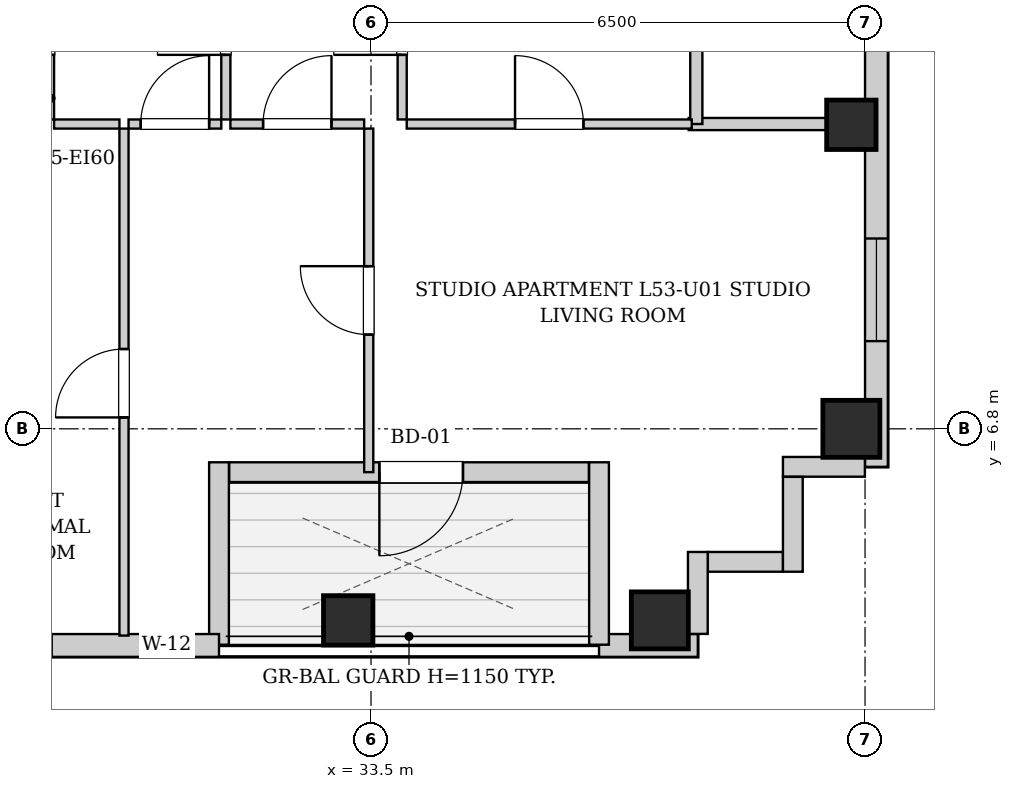
"""IFC4 building model, lengths in metres.
Left out: names, types, materials, properties, quantities, classifications, styles, units other than length and angle.
Written with IfcOpenShell. Run it as: python <this file> out.ifc"""

import sys

from ifc_helpers import new_model, si_unit, direction, frame, frame_2d, origin, origin_2d, place, context, subcontext, project, spatial, rectangle, extrude, element, fill, save


model = new_model("IFC4")
c1 = context("Model", 3, precision=1e-05, world=origin(), true_north=direction((0.0, 1.0)))
c2 = subcontext(c1, "Body", "Model", "MODEL_VIEW")
j1 = project(units=[si_unit("LENGTHUNIT", "METRE"), si_unit("PLANEANGLEUNIT", "RADIAN")], contexts=[c1])
p1 = place(None, origin())
s1 = spatial("IfcSite", under=j1, at=p1, CompositionType="ELEMENT")
p2 = place(p1, origin())
s2 = spatial("IfcBuilding", under=s1, at=p2, CompositionType="ELEMENT")
p3 = place(p2, frame((0.0, 0.0, 184.3)))
s3 = spatial("IfcBuildingStorey", under=s2, at=p3, CompositionType="ELEMENT", Elevation=184.3)
p4 = place(p3, frame((33.2, 4.28, 0.0), z_axis=(0.0, 0.0, 1.0), x_axis=(1.0, 0.0, 0.0)))
e1 = element("IfcColumn", 1, at=p4, inside=s3, PredefinedType="COLUMN", context=c2, shape_type="SweptSolid", body=[
    extrude(rectangle(XDim=0.65, YDim=0.65, at=origin_2d()), origin(), (0.0, 0.0, 1.0), 3.3),
])
for number, where, z_axis, x_axis in (
    (2, (37.3, 4.28, 0.0), (0.0, 0.0, 1.0), (1.0, 0.0, 0.0)),
    (3, (39.82, 6.8, 0.0), (0.0, 0.0, 1.0), (1.0, 0.0, 0.0)),
):
    element("IfcColumn", number, at=place(p3, frame(where, z_axis=z_axis, x_axis=x_axis)), inside=s3, PredefinedType="COLUMN", context=c2, shape_type="SweptSolid", body=[
        extrude(rectangle(XDim=0.75, YDim=0.75, at=origin_2d()), origin(), (0.0, 0.0, 1.0), 3.3),
    ])
p5 = place(p3, frame((39.82, 10.8, 0.0), z_axis=(0.0, 0.0, 1.0), x_axis=(1.0, 0.0, 0.0)))
e4 = element("IfcColumn", 4, at=p5, inside=s3, PredefinedType="COLUMN", context=c2, shape_type="SweptSolid", body=[
    extrude(rectangle(XDim=0.65, YDim=0.65, at=origin_2d()), origin(), (0.0, 0.0, 1.0), 3.3),
])
p6 = place(p3, frame((40.15, 37.7, 0.0), z_axis=(0.0, 0.0, 1.0), x_axis=(0.0, -1.0, 0.0)))
e5 = element("IfcWall", 5, at=p6, inside=s3, PredefinedType="SOLIDWALL", context=c2, shape_type="SweptSolid", body=[
    extrude(rectangle(XDim=31.4, YDim=0.3, at=frame_2d((15.7, 0.0))), origin(), (0.0, 0.0, 1.0), 3.04),
])
p7 = place(p6, frame((28.396, 0.0, 0.55)))
e6 = element("IfcOpeningElement", 6, at=p7, cuts=e5, PredefinedType="OPENING", context=c2, shape_type="SweptSolid", body=[
    extrude(rectangle(XDim=1.35, YDim=1.2, at=frame_2d((0.675, 0.6))), frame((0.0, 0.16, 0.0), z_axis=(0.0, -1.0, 0.0), x_axis=(1.0, 0.0, 0.0)), (0.0, 0.0, 1.0), 0.32),
])
p8 = place(p6, frame((1.653, 0.0, 0.55)))
e7 = element("IfcOpeningElement", 7, at=p8, cuts=e5, PredefinedType="OPENING", context=c2, shape_type="SweptSolid", body=[
    extrude(rectangle(XDim=1.35, YDim=1.2, at=frame_2d((0.675, 0.6))), frame((0.0, 0.16, 0.0), z_axis=(0.0, -1.0, 0.0), x_axis=(1.0, 0.0, 0.0)), (0.0, 0.0, 1.0), 0.32),
])
p9 = place(p6, frame((19.683, 0.0, 0.55)))
e8 = element("IfcOpeningElement", 8, at=p9, cuts=e5, PredefinedType="OPENING", context=c2, shape_type="SweptSolid", body=[
    extrude(rectangle(XDim=1.35, YDim=1.2, at=frame_2d((0.675, 0.6))), frame((0.0, 0.16, 0.0), z_axis=(0.0, -1.0, 0.0), x_axis=(1.0, 0.0, 0.0)), (0.0, 0.0, 1.0), 0.32),
])
p10 = place(p6, frame((10.367, 0.0, 0.55)))
e9 = element("IfcOpeningElement", 9, at=p10, cuts=e5, PredefinedType="OPENING", context=c2, shape_type="SweptSolid", body=[
    extrude(rectangle(XDim=1.35, YDim=1.2, at=frame_2d((0.675, 0.6))), frame((0.0, 0.16, 0.0), z_axis=(0.0, -1.0, 0.0), x_axis=(1.0, 0.0, 0.0)), (0.0, 0.0, 1.0), 0.32),
])
p11 = place(p3, frame((37.8, 3.95, 0.0), z_axis=(0.0, 0.0, 1.0), x_axis=(-1.0, 0.0, 0.0)))
e10 = element("IfcWall", 10, at=p11, inside=s3, PredefinedType="SOLIDWALL", context=c2, shape_type="SweptSolid", body=[
    extrude(rectangle(XDim=1.3, YDim=0.3, at=frame_2d((0.65, 0.0))), origin(), (0.0, 0.0, 1.0), 3.04),
])
p12 = place(p3, frame((36.5, 3.96, 0.0), z_axis=(0.0, 0.0, 1.0), x_axis=(0.0, 1.0, 0.0)))
e11 = element("IfcWall", 11, at=p12, inside=s3, PredefinedType="SOLIDWALL", context=c2, shape_type="SweptSolid", body=[
    extrude(rectangle(XDim=2.4, YDim=0.26, at=frame_2d((1.2, 0.0))), origin(), (0.0, 0.0, 1.0), 3.04),
])
p13 = place(p3, frame((36.366, 6.23, 0.0), z_axis=(0.0, 0.0, 1.0), x_axis=(-1.0, 0.0, 0.0)))
e12 = element("IfcWall", 12, at=p13, inside=s3, PredefinedType="SOLIDWALL", context=c2, shape_type="SweptSolid", body=[
    extrude(rectangle(XDim=4.732, YDim=0.26, at=frame_2d((2.366, 0.0))), origin(), (0.0, 0.0, 1.0), 3.04),
])
p14 = place(p13, frame((1.656, 0.0, 0.0)))
e13 = element("IfcOpeningElement", 13, at=p14, cuts=e12, PredefinedType="OPENING", context=c2, shape_type="SweptSolid", body=[
    extrude(rectangle(XDim=1.1, YDim=2.0, at=frame_2d((0.55, 1.0))), frame((0.0, 0.14, 0.0), z_axis=(0.0, -1.0, 0.0), x_axis=(1.0, 0.0, 0.0)), (0.0, 0.0, 1.0), 0.28),
])
p15 = place(p3, frame((31.5, 6.36, 0.0), z_axis=(0.0, 0.0, 1.0), x_axis=(0.0, -1.0, 0.0)))
e14 = element("IfcWall", 14, at=p15, inside=s3, PredefinedType="SOLIDWALL", context=c2, shape_type="SweptSolid", body=[
    extrude(rectangle(XDim=2.4, YDim=0.26, at=frame_2d((1.2, 0.0))), origin(), (0.0, 0.0, 1.0), 3.04),
])
p16 = place(p3, frame((31.5, 3.95, 0.0), z_axis=(0.0, 0.0, 1.0), x_axis=(-1.0, 0.0, 0.0)))
e15 = element("IfcWall", 15, at=p16, inside=s3, PredefinedType="SOLIDWALL", context=c2, shape_type="SweptSolid", body=[
    extrude(rectangle(XDim=11.2, YDim=0.3, at=frame_2d((5.6, 0.0))), origin(), (0.0, 0.0, 1.0), 3.04),
])
p17 = place(p16, frame((9.0, 0.0, 0.55)))
e16 = element("IfcOpeningElement", 16, at=p17, cuts=e15, PredefinedType="OPENING", context=c2, shape_type="SweptSolid", body=[
    extrude(rectangle(XDim=1.35, YDim=1.2, at=frame_2d((0.675, 0.6))), frame((0.0, 0.16, 0.0), z_axis=(0.0, -1.0, 0.0), x_axis=(1.0, 0.0, 0.0)), (0.0, 0.0, 1.0), 0.32),
])
p18 = place(p16, frame((2.201, 0.0, 0.55)))
e17 = element("IfcOpeningElement", 17, at=p18, cuts=e15, PredefinedType="OPENING", context=c2, shape_type="SweptSolid", body=[
    extrude(rectangle(XDim=1.35, YDim=1.2, at=frame_2d((0.675, 0.6))), frame((0.0, 0.16, 0.0), z_axis=(0.0, -1.0, 0.0), x_axis=(1.0, 0.0, 0.0)), (0.0, 0.0, 1.0), 0.32),
])
p19 = place(p16, frame((0.35, 0.0, 0.55)))
e18 = element("IfcOpeningElement", 18, at=p19, cuts=e15, PredefinedType="OPENING", context=c2, shape_type="SweptSolid", body=[
    extrude(rectangle(XDim=0.68, YDim=1.2, at=frame_2d((0.34, 0.6))), frame((0.0, 0.16, 0.0), z_axis=(0.0, -1.0, 0.0), x_axis=(1.0, 0.0, 0.0)), (0.0, 0.0, 1.0), 0.32),
])
p20 = place(p3, frame((39.998, 6.3, 0.0), z_axis=(0.0, 0.0, 1.0), x_axis=(-1.0, 0.0, 0.0)))
e19 = element("IfcWall", 19, at=p20, inside=s3, PredefinedType="SOLIDWALL", context=c2, shape_type="SweptSolid", body=[
    extrude(rectangle(XDim=1.078, YDim=0.26, at=frame_2d((0.539, 0.0))), origin(), (0.0, 0.0, 1.0), 3.04),
])
p21 = place(p3, frame((39.05, 6.168, 0.0), z_axis=(0.0, 0.0, 1.0), x_axis=(0.0, -1.0, 0.0)))
e20 = element("IfcWall", 20, at=p21, inside=s3, PredefinedType="SOLIDWALL", context=c2, shape_type="SweptSolid", body=[
    extrude(rectangle(XDim=1.248, YDim=0.26, at=frame_2d((0.624, 0.0))), origin(), (0.0, 0.0, 1.0), 3.04),
])
p22 = place(p3, frame((38.918, 5.05, 0.0), z_axis=(0.0, 0.0, 1.0), x_axis=(-1.0, 0.0, 0.0)))
e21 = element("IfcWall", 21, at=p22, inside=s3, PredefinedType="SOLIDWALL", context=c2, shape_type="SweptSolid", body=[
    extrude(rectangle(XDim=0.986, YDim=0.26, at=frame_2d((0.493, 0.0))), origin(), (0.0, 0.0, 1.0), 3.04),
])
p23 = place(p3, frame((37.8, 5.18, 0.0), z_axis=(0.0, 0.0, 1.0), x_axis=(0.0, -1.0, 0.0)))
e22 = element("IfcWall", 22, at=p23, inside=s3, PredefinedType="SOLIDWALL", context=c2, shape_type="SweptSolid", body=[
    extrude(rectangle(XDim=1.078, YDim=0.26, at=frame_2d((0.539, 0.0))), origin(), (0.0, 0.0, 1.0), 3.04),
])
p24 = place(p3, frame((37.68, 10.81, 0.0), z_axis=(0.0, 0.0, 1.0), x_axis=(1.0, 0.0, 0.0)))
e23 = element("IfcWall", 23, at=p24, inside=s3, PredefinedType="PARTITIONING", context=c2, shape_type="SweptSolid", body=[
    extrude(rectangle(XDim=2.34, YDim=0.16, at=frame_2d((1.17, 0.0))), origin(), (0.0, 0.0, 1.0), 3.04),
])
p25 = place(p3, frame((37.78, 10.81, 0.0), z_axis=(0.0, 0.0, 1.0), x_axis=(0.0, 1.0, 0.0)))
e24 = element("IfcWall", 24, at=p25, inside=s3, PredefinedType="PARTITIONING", context=c2, shape_type="SweptSolid", body=[
    extrude(rectangle(XDim=2.66, YDim=0.16, at=frame_2d((1.33, 0.0))), origin(), (0.0, 0.0, 1.0), 3.04),
])
p26 = place(p3, frame((29.27, 10.87, 0.0), z_axis=(0.0, 0.0, 1.0), x_axis=(0.0, 1.0, 0.0)))
e25 = element("IfcWall", 25, at=p26, inside=s3, PredefinedType="PARTITIONING", context=c2, shape_type="SweptSolid", body=[
    extrude(rectangle(XDim=2.6, YDim=0.12, at=frame_2d((1.3, 0.0))), origin(), (0.0, 0.0, 1.0), 3.04),
])
p27 = place(p26, frame((0.85, 0.0, 0.0)))
e26 = element("IfcOpeningElement", 26, at=p27, cuts=e25, PredefinedType="OPENING", context=c2, shape_type="SweptSolid", body=[
    extrude(rectangle(XDim=0.9, YDim=2.05, at=frame_2d((0.45, 1.025))), frame((0.0, 0.07, 0.0), z_axis=(0.0, -1.0, 0.0), x_axis=(1.0, 0.0, 0.0)), (0.0, 0.0, 1.0), 0.14),
])
p28 = place(p3, frame((31.59, 10.87, 0.0), z_axis=(0.0, 0.0, 1.0), x_axis=(0.0, 1.0, 0.0)))
e27 = element("IfcWall", 27, at=p28, inside=s3, PredefinedType="PARTITIONING", context=c2, shape_type="SweptSolid", body=[
    extrude(rectangle(XDim=2.6, YDim=0.12, at=frame_2d((1.3, 0.0))), origin(), (0.0, 0.0, 1.0), 3.04),
])
p29 = place(p28, frame((0.85, 0.0, 0.0)))
e28 = element("IfcOpeningElement", 28, at=p29, cuts=e27, PredefinedType="OPENING", context=c2, shape_type="SweptSolid", body=[
    extrude(rectangle(XDim=0.9, YDim=2.05, at=frame_2d((0.45, 1.025))), frame((0.0, 0.07, 0.0), z_axis=(0.0, -1.0, 0.0), x_axis=(1.0, 0.0, 0.0)), (0.0, 0.0, 1.0), 0.14),
])
p30 = place(p3, frame((29.33, 10.81, 0.0), z_axis=(0.0, 0.0, 1.0), x_axis=(1.0, 0.0, 0.0)))
e29 = element("IfcWall", 29, at=p30, inside=s3, PredefinedType="PARTITIONING", context=c2, shape_type="SweptSolid", body=[
    extrude(rectangle(XDim=0.86, YDim=0.12, at=frame_2d((0.43, 0.0))), origin(), (0.0, 0.0, 1.0), 3.04),
])
p31 = place(p3, frame((30.31, 10.81, 0.0), z_axis=(0.0, 0.0, 1.0), x_axis=(1.0, 0.0, 0.0)))
e30 = element("IfcWall", 30, at=p31, inside=s3, PredefinedType="PARTITIONING", context=c2, shape_type="SweptSolid", body=[
    extrude(rectangle(XDim=1.22, YDim=0.12, at=frame_2d((0.61, 0.0))), origin(), (0.0, 0.0, 1.0), 3.04),
])
p32 = place(p31, frame((0.16, 0.0, 0.0)))
e31 = element("IfcOpeningElement", 31, at=p32, cuts=e30, PredefinedType="OPENING", context=c2, shape_type="SweptSolid", body=[
    extrude(rectangle(XDim=0.9, YDim=2.05, at=frame_2d((0.45, 1.025))), frame((0.0, 0.07, 0.0), z_axis=(0.0, -1.0, 0.0), x_axis=(1.0, 0.0, 0.0)), (0.0, 0.0, 1.0), 0.14),
])
p33 = place(p3, frame((33.91, 10.87, 0.0), z_axis=(0.0, 0.0, 1.0), x_axis=(0.0, 1.0, 0.0)))
e32 = element("IfcWall", 32, at=p33, inside=s3, PredefinedType="PARTITIONING", context=c2, shape_type="SweptSolid", body=[
    extrude(rectangle(XDim=2.6, YDim=0.12, at=frame_2d((1.3, 0.0))), origin(), (0.0, 0.0, 1.0), 3.04),
])
p34 = place(p33, frame((0.85, 0.0, 0.0)))
e33 = element("IfcOpeningElement", 33, at=p34, cuts=e32, PredefinedType="OPENING", context=c2, shape_type="SweptSolid", body=[
    extrude(rectangle(XDim=0.9, YDim=2.05, at=frame_2d((0.45, 1.025))), frame((0.0, 0.07, 0.0), z_axis=(0.0, -1.0, 0.0), x_axis=(1.0, 0.0, 0.0)), (0.0, 0.0, 1.0), 0.14),
])
p35 = place(p3, frame((31.65, 10.81, 0.0), z_axis=(0.0, 0.0, 1.0), x_axis=(1.0, 0.0, 0.0)))
e34 = element("IfcWall", 34, at=p35, inside=s3, PredefinedType="PARTITIONING", context=c2, shape_type="SweptSolid", body=[
    extrude(rectangle(XDim=1.76, YDim=0.12, at=frame_2d((0.88, 0.0))), origin(), (0.0, 0.0, 1.0), 3.04),
])
p36 = place(p35, frame((0.43, 0.0, 0.0)))
e35 = element("IfcOpeningElement", 35, at=p36, cuts=e34, PredefinedType="OPENING", context=c2, shape_type="SweptSolid", body=[
    extrude(rectangle(XDim=0.9, YDim=2.05, at=frame_2d((0.45, 1.025))), frame((0.0, 0.07, 0.0), z_axis=(0.0, -1.0, 0.0), x_axis=(1.0, 0.0, 0.0)), (0.0, 0.0, 1.0), 0.14),
])
p37 = place(p3, frame((33.97, 10.81, 0.0), z_axis=(0.0, 0.0, 1.0), x_axis=(1.0, 0.0, 0.0)))
e36 = element("IfcWall", 36, at=p37, inside=s3, PredefinedType="PARTITIONING", context=c2, shape_type="SweptSolid", body=[
    extrude(rectangle(XDim=3.75, YDim=0.12, at=frame_2d((1.875, 0.0))), origin(), (0.0, 0.0, 1.0), 3.04),
])
p38 = place(p37, frame((1.425, 0.0, 0.0)))
e37 = element("IfcOpeningElement", 37, at=p38, cuts=e36, PredefinedType="OPENING", context=c2, shape_type="SweptSolid", body=[
    extrude(rectangle(XDim=0.9, YDim=2.05, at=frame_2d((0.45, 1.025))), frame((0.0, 0.07, 0.0), z_axis=(0.0, -1.0, 0.0), x_axis=(1.0, 0.0, 0.0)), (0.0, 0.0, 1.0), 0.14),
])
p39 = place(p3, frame((30.25, 4.08, 0.0), z_axis=(0.0, 0.0, 1.0), x_axis=(0.0, 1.0, 0.0)))
e38 = element("IfcWall", 38, at=p39, inside=s3, PredefinedType="PARTITIONING", context=c2, shape_type="SweptSolid", body=[
    extrude(rectangle(XDim=6.67, YDim=0.12, at=frame_2d((3.335, 0.0))), origin(), (0.0, 0.0, 1.0), 3.04),
])
p40 = place(p39, frame((2.87, 0.0, 0.0)))
e39 = element("IfcOpeningElement", 39, at=p40, cuts=e38, PredefinedType="OPENING", context=c2, shape_type="SweptSolid", body=[
    extrude(rectangle(XDim=0.9, YDim=2.05, at=frame_2d((0.45, 1.025))), frame((0.0, 0.07, 0.0), z_axis=(0.0, -1.0, 0.0), x_axis=(1.0, 0.0, 0.0)), (0.0, 0.0, 1.0), 0.14),
])
p41 = place(p3, frame((33.47, 6.23, 0.0), z_axis=(0.0, 0.0, 1.0), x_axis=(0.0, 1.0, 0.0)))
e40 = element("IfcWall", 40, at=p41, inside=s3, PredefinedType="PARTITIONING", context=c2, shape_type="SweptSolid", body=[
    extrude(rectangle(XDim=4.52, YDim=0.12, at=frame_2d((2.26, 0.0))), origin(), (0.0, 0.0, 1.0), 3.04),
])
p42 = place(p41, frame((1.81, 0.0, 0.0)))
e41 = element("IfcOpeningElement", 41, at=p42, cuts=e40, PredefinedType="OPENING", context=c2, shape_type="SweptSolid", body=[
    extrude(rectangle(XDim=0.9, YDim=2.05, at=frame_2d((0.45, 1.025))), frame((0.0, 0.07, 0.0), z_axis=(0.0, -1.0, 0.0), x_axis=(1.0, 0.0, 0.0)), (0.0, 0.0, 1.0), 0.14),
])
p43 = place(p29, origin())
e42 = element("IfcDoor", 42, at=p43, inside=s3, OperationType="SINGLE_SWING_LEFT", PredefinedType="DOOR", context=c2, shape_type="SweptSolid", body=[
    extrude(rectangle(XDim=0.9, YDim=2.05, at=frame_2d((0.45, 1.025))), frame((0.0, 0.025, 0.0), z_axis=(0.0, -1.0, 0.0), x_axis=(1.0, 0.0, 0.0)), (0.0, 0.0, 1.0), 0.05),
])
fill(e28, e42)
p44 = place(p32, origin())
e43 = element("IfcDoor", 43, at=p44, inside=s3, OperationType="SINGLE_SWING_RIGHT", PredefinedType="DOOR", context=c2, shape_type="SweptSolid", body=[
    extrude(rectangle(XDim=0.9, YDim=2.05, at=frame_2d((0.45, 1.025))), frame((0.0, 0.025, 0.0), z_axis=(0.0, -1.0, 0.0), x_axis=(1.0, 0.0, 0.0)), (0.0, 0.0, 1.0), 0.05),
])
fill(e31, e43)
p45 = place(p34, origin())
e44 = element("IfcDoor", 44, at=p45, inside=s3, OperationType="SINGLE_SWING_LEFT", PredefinedType="DOOR", context=c2, shape_type="SweptSolid", body=[
    extrude(rectangle(XDim=0.9, YDim=2.05, at=frame_2d((0.45, 1.025))), frame((0.0, 0.025, 0.0), z_axis=(0.0, -1.0, 0.0), x_axis=(1.0, 0.0, 0.0)), (0.0, 0.0, 1.0), 0.05),
])
fill(e33, e44)
p46 = place(p36, origin())
e45 = element("IfcDoor", 45, at=p46, inside=s3, OperationType="SINGLE_SWING_RIGHT", PredefinedType="DOOR", context=c2, shape_type="SweptSolid", body=[
    extrude(rectangle(XDim=0.9, YDim=2.05, at=frame_2d((0.45, 1.025))), frame((0.0, 0.025, 0.0), z_axis=(0.0, -1.0, 0.0), x_axis=(1.0, 0.0, 0.0)), (0.0, 0.0, 1.0), 0.05),
])
fill(e35, e45)
p47 = place(p38, origin())
e46 = element("IfcDoor", 46, at=p47, inside=s3, OperationType="SINGLE_SWING_LEFT", PredefinedType="DOOR", context=c2, shape_type="SweptSolid", body=[
    extrude(rectangle(XDim=0.9, YDim=2.05, at=frame_2d((0.45, 1.025))), frame((0.0, 0.025, 0.0), z_axis=(0.0, -1.0, 0.0), x_axis=(1.0, 0.0, 0.0)), (0.0, 0.0, 1.0), 0.05),
])
fill(e37, e46)
p48 = place(p40, origin())
e47 = element("IfcDoor", 47, at=p48, inside=s3, OperationType="SINGLE_SWING_LEFT", PredefinedType="DOOR", context=c2, shape_type="SweptSolid", body=[
    extrude(rectangle(XDim=0.9, YDim=2.05, at=frame_2d((0.45, 1.025))), frame((0.0, 0.025, 0.0), z_axis=(0.0, -1.0, 0.0), x_axis=(1.0, 0.0, 0.0)), (0.0, 0.0, 1.0), 0.05),
])
fill(e39, e47)
p49 = place(p42, origin())
e48 = element("IfcDoor", 48, at=p49, inside=s3, OperationType="SINGLE_SWING_RIGHT", PredefinedType="DOOR", context=c2, shape_type="SweptSolid", body=[
    extrude(rectangle(XDim=0.9, YDim=2.05, at=frame_2d((0.45, 1.025))), frame((0.0, 0.025, 0.0), z_axis=(0.0, -1.0, 0.0), x_axis=(1.0, 0.0, 0.0)), (0.0, 0.0, 1.0), 0.05),
])
fill(e41, e48)
p50 = place(p14, origin())
e49 = element("IfcDoor", 49, at=p50, inside=s3, OperationType="SINGLE_SWING_RIGHT", PredefinedType="DOOR", context=c2, shape_type="SweptSolid", body=[
    extrude(rectangle(XDim=1.1, YDim=2.0, at=frame_2d((0.55, 1.0))), frame((0.0, 0.025, 0.0), z_axis=(0.0, -1.0, 0.0), x_axis=(1.0, 0.0, 0.0)), (0.0, 0.0, 1.0), 0.05),
])
fill(e13, e49)
p51 = place(p19, origin())
e50 = element("IfcWindow", 50, at=p51, inside=s3, PartitioningType="SINGLE_PANEL", PredefinedType="WINDOW", context=c2, shape_type="SweptSolid", body=[
    extrude(rectangle(XDim=0.68, YDim=1.2, at=frame_2d((0.34, 0.6))), frame((0.0, 0.03, 0.0), z_axis=(0.0, -1.0, 0.0), x_axis=(1.0, 0.0, 0.0)), (0.0, 0.0, 1.0), 0.06),
])
fill(e18, e50)
p52 = place(p7, origin())
e51 = element("IfcWindow", 51, at=p52, inside=s3, PartitioningType="SINGLE_PANEL", PredefinedType="WINDOW", context=c2, shape_type="SweptSolid", body=[
    extrude(rectangle(XDim=1.35, YDim=1.2, at=frame_2d((0.675, 0.6))), frame((0.0, 0.03, 0.0), z_axis=(0.0, -1.0, 0.0), x_axis=(1.0, 0.0, 0.0)), (0.0, 0.0, 1.0), 0.06),
])
fill(e6, e51)
save(model, sys.argv[1])
